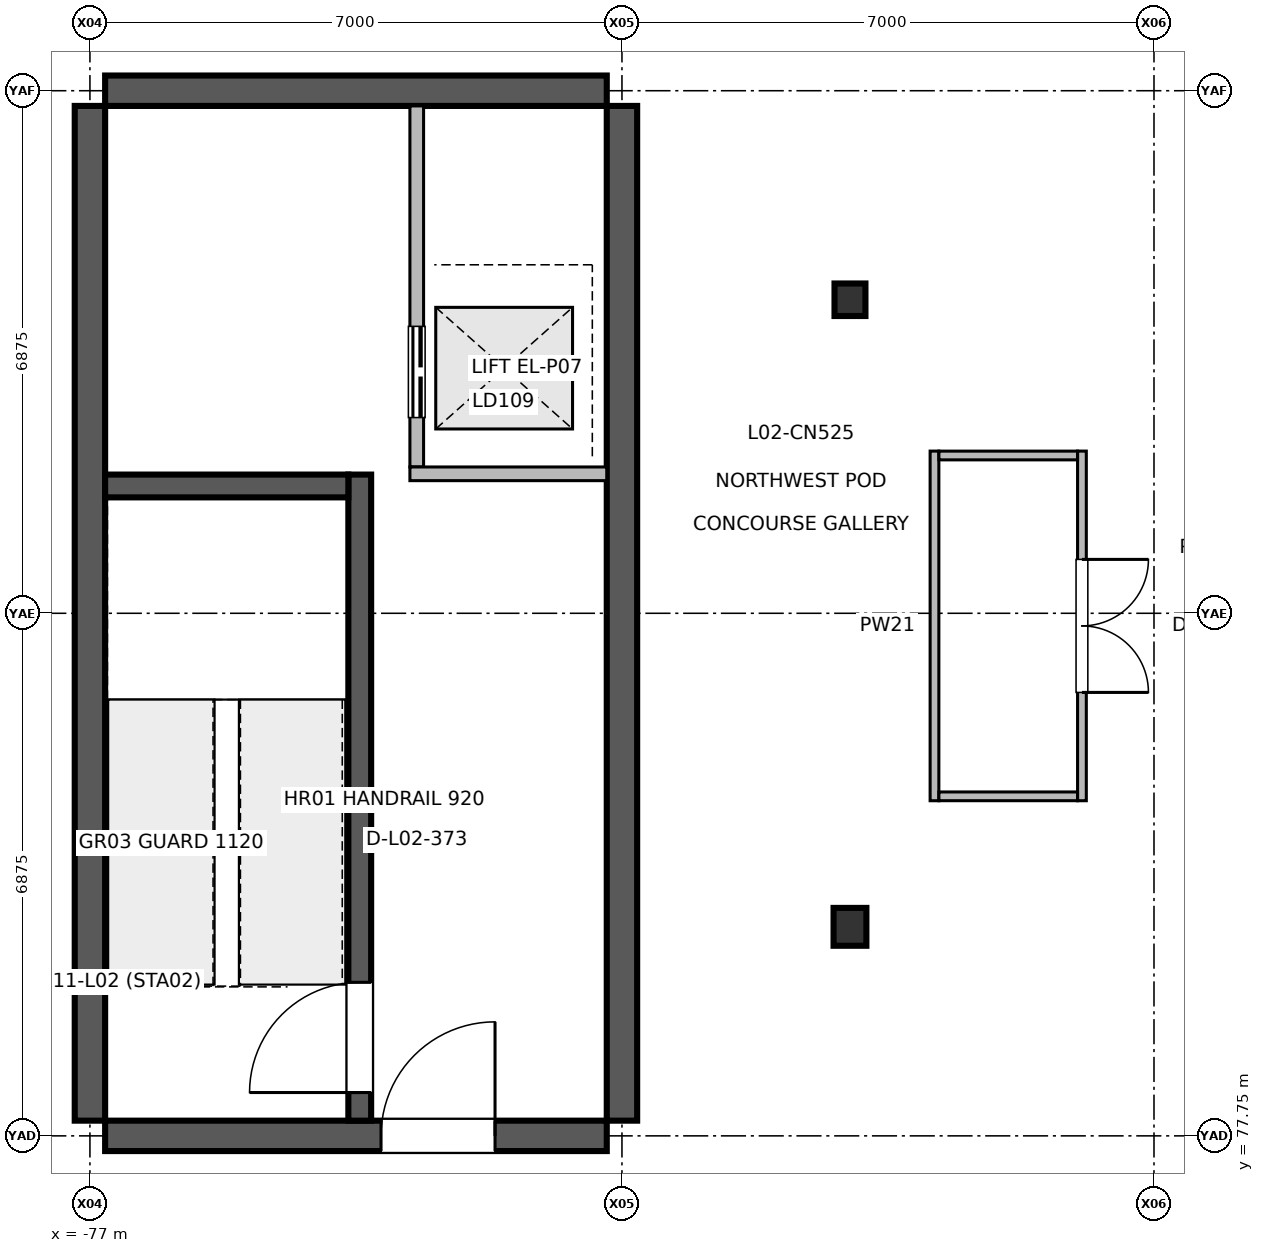
"""IFC4 building model, lengths in metres.
Left out: names, types, materials, properties, quantities, classifications, styles, units other than length and angle.
Written with IfcOpenShell. Run it as: python <this file> out.ifc"""

import sys

from ifc_helpers import new_model, si_unit, direction, frame, frame_2d, origin, origin_2d, place, context, subcontext, project, spatial, rectangle, i_section, extrude, element, fill, save


model = new_model("IFC4")
c1 = context("Model", 3, precision=1e-05, world=origin(), true_north=direction((0.0, 1.0)))
c2 = subcontext(c1, "Body", "Model", "MODEL_VIEW")
j1 = project(units=[si_unit("LENGTHUNIT", "METRE"), si_unit("PLANEANGLEUNIT", "RADIAN")], contexts=[c1])
p1 = place(None, origin())
s1 = spatial("IfcSite", under=j1, at=p1, CompositionType="ELEMENT")
p2 = place(p1, origin())
s2 = spatial("IfcBuilding", under=s1, at=p2, CompositionType="ELEMENT")
p3 = place(p2, frame((0.0, 0.0, 6.0)))
s3 = spatial("IfcBuildingStorey", under=s2, at=p3, CompositionType="ELEMENT", Elevation=6.0)
p4 = place(p3, frame((-67.0, 80.5, 0.0), z_axis=(0.0, 0.0, 1.0), x_axis=(1.0, 0.0, 0.0)))
e1 = element("IfcColumn", 1, at=p4, inside=s3, PredefinedType="COLUMN", context=c2, shape_type="SweptSolid", body=[
    extrude(i_section(OverallWidth=0.432, OverallDepth=0.498, WebThickness=0.024, FlangeThickness=0.038, at=origin_2d()), origin(), (0.0, 0.0, 1.0), 5.398),
])
p5 = place(p3, frame((-67.0, 88.75, 0.0), z_axis=(0.0, 0.0, 1.0), x_axis=(1.0, 0.0, 0.0)))
e2 = element("IfcColumn", 2, at=p5, inside=s3, PredefinedType="COLUMN", context=c2, shape_type="SweptSolid", body=[
    extrude(i_section(OverallWidth=0.407, OverallDepth=0.428, WebThickness=0.02, FlangeThickness=0.035, at=origin_2d()), origin(), (0.0, 0.0, 1.0), 5.398),
])
for number, where, z_axis, x_axis in (
    (3, (-77.0, 77.95, 0.0), (0.0, 0.0, 1.0), (0.0, 1.0, 0.0)),
    (4, (-70.0, 77.95, 0.0), (0.0, 0.0, 1.0), (0.0, 1.0, 0.0)),
):
    element("IfcWall", number, at=place(p3, frame(where, z_axis=z_axis, x_axis=x_axis)), inside=s3, PredefinedType="SHEAR", context=c2, shape_type="SweptSolid", body=[
        extrude(rectangle(XDim=13.35, YDim=0.4, at=frame_2d((6.675, 0.0))), origin(), (0.0, 0.0, 1.0), 5.18),
    ])
p6 = place(p3, frame((-76.8, 77.75, 0.0), z_axis=(0.0, 0.0, 1.0), x_axis=(1.0, 0.0, 0.0)))
e5 = element("IfcWall", 5, at=p6, inside=s3, PredefinedType="SHEAR", context=c2, shape_type="SweptSolid", body=[
    extrude(rectangle(XDim=6.6, YDim=0.4, at=frame_2d((3.3, 0.0))), origin(), (0.0, 0.0, 1.0), 5.18),
])
p7 = place(p6, frame((3.63, 0.0, 0.0)))
e6 = element("IfcOpeningElement", 6, at=p7, cuts=e5, PredefinedType="OPENING", context=c2, shape_type="SweptSolid", body=[
    extrude(rectangle(XDim=1.5, YDim=2.2, at=frame_2d((0.75, 1.1))), frame((0.0, 0.21, 0.0), z_axis=(0.0, -1.0, 0.0), x_axis=(1.0, 0.0, 0.0)), (0.0, 0.0, 1.0), 0.42),
])
p8 = place(p3, frame((-76.8, 91.5, 0.0), z_axis=(0.0, 0.0, 1.0), x_axis=(1.0, 0.0, 0.0)))
e7 = element("IfcWall", 7, at=p8, inside=s3, PredefinedType="SHEAR", context=c2, shape_type="SweptSolid", body=[
    extrude(rectangle(XDim=6.6, YDim=0.4, at=frame_2d((3.3, 0.0))), origin(), (0.0, 0.0, 1.0), 5.18),
])
p9 = place(p3, frame((-73.45, 77.95, 0.0), z_axis=(0.0, 0.0, 1.0), x_axis=(0.0, 1.0, 0.0)))
e8 = element("IfcWall", 8, at=p9, inside=s3, PredefinedType="SHEAR", context=c2, shape_type="SweptSolid", body=[
    extrude(rectangle(XDim=8.5, YDim=0.3, at=frame_2d((4.25, 0.0))), origin(), (0.0, 0.0, 1.0), 5.18),
])
p10 = place(p9, frame((0.37, 0.0, 0.0)))
e9 = element("IfcOpeningElement", 9, at=p10, cuts=e8, PredefinedType="OPENING", context=c2, shape_type="SweptSolid", body=[
    extrude(rectangle(XDim=1.45, YDim=2.2, at=frame_2d((0.725, 1.1))), frame((0.0, 0.16, 0.0), z_axis=(0.0, -1.0, 0.0), x_axis=(1.0, 0.0, 0.0)), (0.0, 0.0, 1.0), 0.32),
])
p11 = place(p3, frame((-72.7, 86.55, 0.0), z_axis=(0.0, 0.0, 1.0), x_axis=(0.0, 1.0, 0.0)))
e10 = element("IfcWall", 10, at=p11, inside=s3, PredefinedType="PARTITIONING", context=c2, shape_type="SweptSolid", body=[
    extrude(rectangle(XDim=4.75, YDim=0.18, at=frame_2d((2.375, 0.0))), origin(), (0.0, 0.0, 1.0), 4.42),
])
p12 = place(p11, frame((0.65, 0.0, 0.0)))
e11 = element("IfcOpeningElement", 11, at=p12, cuts=e10, PredefinedType="OPENING", context=c2, shape_type="SweptSolid", body=[
    extrude(rectangle(XDim=1.2, YDim=2.25, at=frame_2d((0.6, 1.125))), frame((0.0, 0.1, 0.0), z_axis=(0.0, -1.0, 0.0), x_axis=(1.0, 0.0, 0.0)), (0.0, 0.0, 1.0), 0.2),
])
p13 = place(p3, frame((-63.948, 86.759, 0.0), z_axis=(0.0, 0.0, 1.0), x_axis=(0.0, -1.0, 0.0)))
e12 = element("IfcWall", 12, at=p13, inside=s3, PredefinedType="PARTITIONING", context=c2, shape_type="SweptSolid", body=[
    extrude(rectangle(XDim=4.6, YDim=0.115, at=frame_2d((2.3, 0.0))), origin(), (0.0, 0.0, 1.0), 4.42),
])
p14 = place(p13, frame((1.425, 0.0, 0.0)))
e13 = element("IfcOpeningElement", 13, at=p14, cuts=e12, PredefinedType="OPENING", context=c2, shape_type="SweptSolid", body=[
    extrude(rectangle(XDim=1.75, YDim=2.35, at=frame_2d((0.875, 1.175))), frame((0.0, 0.067, 0.0), z_axis=(0.0, -1.0, 0.0), x_axis=(1.0, 0.0, 0.0)), (0.0, 0.0, 1.0), 0.135),
])
p15 = place(p3, frame((-72.79, 86.46, 0.0), z_axis=(0.0, 0.0, 1.0), x_axis=(1.0, 0.0, 0.0)))
e14 = element("IfcWall", 14, at=p15, inside=s3, PredefinedType="PARTITIONING", context=c2, shape_type="SweptSolid", body=[
    extrude(rectangle(XDim=2.59, YDim=0.18, at=frame_2d((1.295, 0.0))), origin(), (0.0, 0.0, 1.0), 4.42),
])
p16 = place(p3, frame((-65.888, 82.159, 0.0), z_axis=(0.0, 0.0, 1.0), x_axis=(0.0, 1.0, 0.0)))
e15 = element("IfcWall", 15, at=p16, inside=s3, PredefinedType="PARTITIONING", context=c2, shape_type="SweptSolid", body=[
    extrude(rectangle(XDim=4.6, YDim=0.115, at=frame_2d((2.3, 0.0))), origin(), (0.0, 0.0, 1.0), 4.42),
])
for number, where, z_axis, x_axis in (
    (16, (-65.83, 82.217, 0.0), (0.0, 0.0, 1.0), (1.0, 0.0, 0.0)),
    (17, (-65.83, 86.701, 0.0), (0.0, 0.0, 1.0), (1.0, 0.0, 0.0)),
):
    element("IfcWall", number, at=place(p3, frame(where, z_axis=z_axis, x_axis=x_axis)), inside=s3, PredefinedType="PARTITIONING", context=c2, shape_type="SweptSolid", body=[
        extrude(rectangle(XDim=1.824, YDim=0.115, at=frame_2d((0.912, 0.0))), origin(), (0.0, 0.0, 1.0), 4.42),
    ])
p17 = place(p3, frame((-76.8, 86.3, 0.0), z_axis=(0.0, 0.0, 1.0), x_axis=(1.0, 0.0, 0.0)))
e18 = element("IfcWall", 18, at=p17, inside=s3, PredefinedType="SHEAR", context=c2, shape_type="SweptSolid", body=[
    extrude(rectangle(XDim=3.2, YDim=0.3, at=frame_2d((1.6, 0.0))), origin(), (0.0, 0.0, 1.0), 5.18),
])
p18 = place(p7, origin())
e19 = element("IfcDoor", 19, at=p18, inside=s3, OperationType="SINGLE_SWING_RIGHT", PredefinedType="DOOR", context=c2, shape_type="SweptSolid", body=[
    extrude(rectangle(XDim=1.5, YDim=2.2, at=frame_2d((0.75, 1.1))), frame((0.0, 0.025, 0.0), z_axis=(0.0, -1.0, 0.0), x_axis=(1.0, 0.0, 0.0)), (0.0, 0.0, 1.0), 0.05),
])
fill(e6, e19)
p19 = place(p10, origin())
e20 = element("IfcDoor", 20, at=p19, inside=s3, OperationType="SINGLE_SWING_LEFT", PredefinedType="DOOR", context=c2, shape_type="SweptSolid", body=[
    extrude(rectangle(XDim=1.45, YDim=2.2, at=frame_2d((0.725, 1.1))), frame((0.0, 0.025, 0.0), z_axis=(0.0, -1.0, 0.0), x_axis=(1.0, 0.0, 0.0)), (0.0, 0.0, 1.0), 0.05),
])
fill(e9, e20)
p20 = place(p12, origin())
e21 = element("IfcDoor", 21, at=p20, inside=s3, OperationType="DOUBLE_DOOR_SLIDING", PredefinedType="DOOR", context=c2, shape_type="SweptSolid", body=[
    extrude(rectangle(XDim=1.2, YDim=2.25, at=frame_2d((0.6, 1.125))), frame((0.0, 0.025, 0.0), z_axis=(0.0, -1.0, 0.0), x_axis=(1.0, 0.0, 0.0)), (0.0, 0.0, 1.0), 0.05),
])
fill(e11, e21)
p21 = place(p14, origin())
e22 = element("IfcDoor", 22, at=p21, inside=s3, OperationType="DOUBLE_DOOR_SINGLE_SWING", PredefinedType="DOOR", context=c2, shape_type="SweptSolid", body=[
    extrude(rectangle(XDim=1.75, YDim=2.35, at=frame_2d((0.875, 1.175))), frame((0.0, 0.025, 0.0), z_axis=(0.0, -1.0, 0.0), x_axis=(1.0, 0.0, 0.0)), (0.0, 0.0, 1.0), 0.05),
])
fill(e13, e22)
save(model, sys.argv[1])
